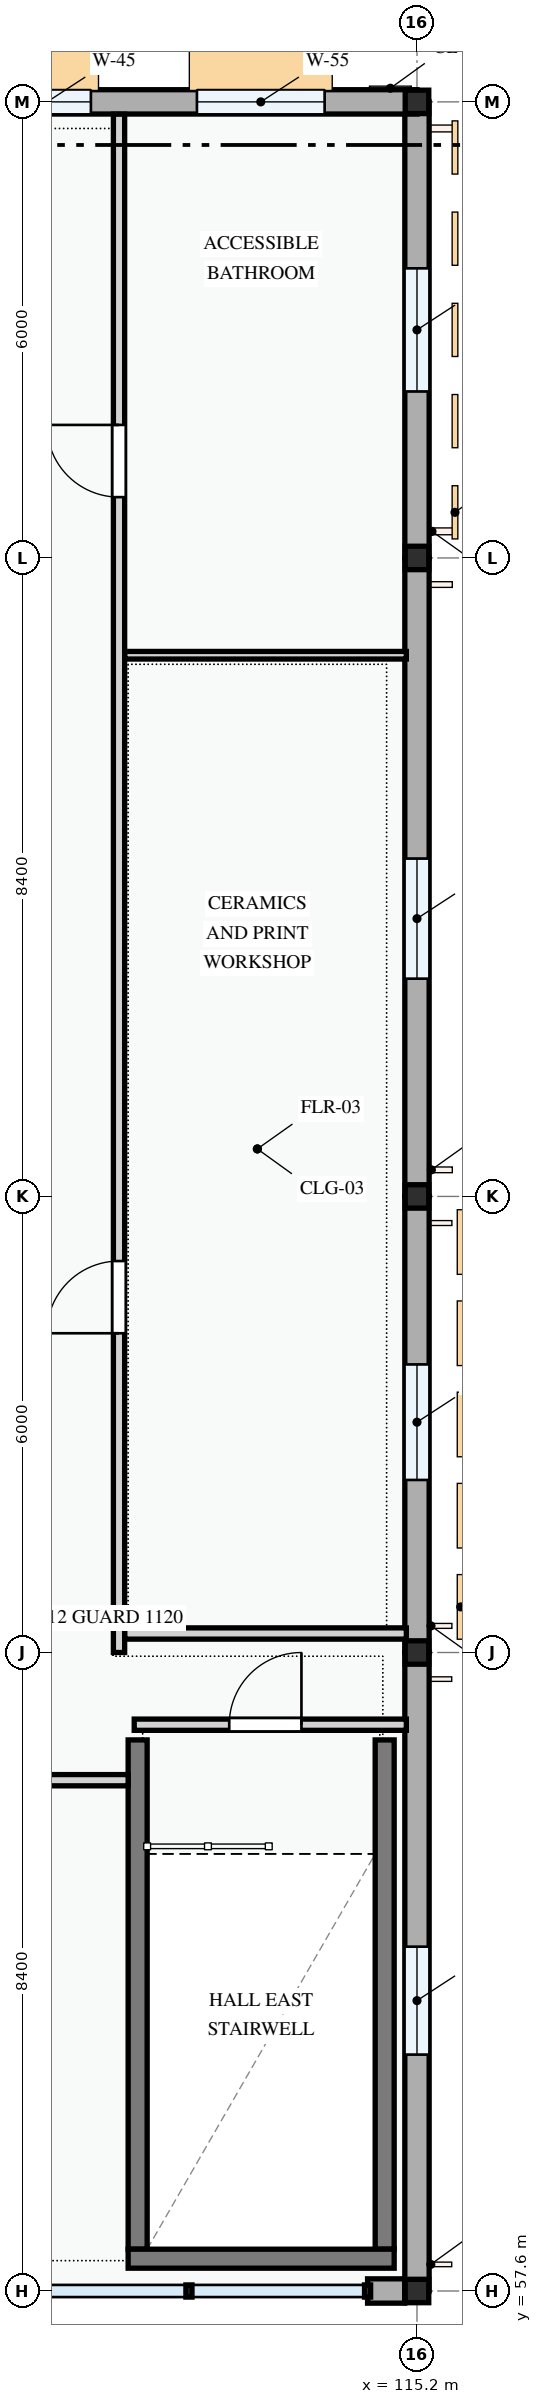
"""IFC4 building model, lengths in metres.
Left out: names, types, materials, properties, quantities, classifications, styles, units other than length and angle.
Written with IfcOpenShell. Run it as: python <this file> out.ifc"""

import sys

from ifc_helpers import new_model, si_unit, direction, frame, frame_2d, origin, origin_2d, place, context, subcontext, project, spatial, rectangle, i_section, extrude, element, fill, save


model = new_model("IFC4")
c1 = context("Model", 3, precision=1e-05, world=origin(), true_north=direction((0.0, 1.0)))
c2 = subcontext(c1, "Body", "Model", "MODEL_VIEW")
j1 = project(units=[si_unit("LENGTHUNIT", "METRE"), si_unit("PLANEANGLEUNIT", "RADIAN")], contexts=[c1])
p1 = place(None, origin())
s1 = spatial("IfcSite", under=j1, at=p1, CompositionType="ELEMENT")
p2 = place(p1, origin())
s2 = spatial("IfcBuilding", under=s1, at=p2, CompositionType="ELEMENT")
p3 = place(p2, frame((0.0, 0.0, 4.5)))
s3 = spatial("IfcBuildingStorey", under=s2, at=p3, CompositionType="ELEMENT", Elevation=4.5)
for number, where, z_axis, x_axis in (
    (1, (115.2, 57.6, 0.0), (0.0, 0.0, 1.0), (1.0, 0.0, 0.0)),
    (2, (115.2, 66.0, 0.0), (0.0, 0.0, 1.0), (1.0, 0.0, 0.0)),
    (3, (115.2, 72.0, 0.0), (0.0, 0.0, 1.0), (1.0, 0.0, 0.0)),
    (4, (115.2, 80.4, 0.0), (0.0, 0.0, 1.0), (1.0, 0.0, 0.0)),
    (5, (115.2, 86.4, 0.0), (0.0, 0.0, 1.0), (1.0, 0.0, 0.0)),
):
    element("IfcColumn", number, at=place(p3, frame(where, z_axis=z_axis, x_axis=x_axis)), inside=s3, PredefinedType="COLUMN", context=c2, shape_type="SweptSolid", body=[
        extrude(i_section(OverallWidth=0.31, OverallDepth=0.308, WebThickness=0.015, FlangeThickness=0.015, FilletRadius=0.012, at=origin_2d()), origin(), (0.0, 0.0, 1.0), 3.6),
    ])
p4 = place(p3, frame((114.55, 57.6, 0.0), z_axis=(0.0, 0.0, 1.0), x_axis=(1.0, 0.0, 0.0)))
e6 = element("IfcWall", 6, at=p4, inside=s3, PredefinedType="STANDARD", context=c2, shape_type="SweptSolid", body=[
    extrude(rectangle(XDim=0.488, YDim=0.32, at=frame_2d((0.244, 0.0))), origin(), (0.0, 0.0, 1.0), 2.862),
])
p5 = place(p3, frame((115.2, 57.6, 0.0), z_axis=(0.0, 0.0, 1.0), x_axis=(0.0, 1.0, 0.0)))
e7 = element("IfcWall", 7, at=p5, inside=s3, PredefinedType="STANDARD", context=c2, shape_type="SweptSolid", body=[
    extrude(rectangle(XDim=8.4, YDim=0.32, at=frame_2d((4.2, 0.0))), origin(), (0.0, 0.0, 1.0), 2.79),
])
p6 = place(p5, frame((3.11, 0.0, 0.85)))
e8 = element("IfcOpeningElement", 8, at=p6, cuts=e7, PredefinedType="OPENING", context=c2, shape_type="SweptSolid", body=[
    extrude(rectangle(XDim=1.42, YDim=1.38, at=frame_2d((0.71, 0.69))), frame((0.0, 0.17, 0.0), z_axis=(0.0, -1.0, 0.0), x_axis=(1.0, 0.0, 0.0)), (0.0, 0.0, 1.0), 0.34),
])
p7 = place(p3, frame((115.2, 66.0, 0.0), z_axis=(0.0, 0.0, 1.0), x_axis=(0.0, 1.0, 0.0)))
e9 = element("IfcWall", 9, at=p7, inside=s3, PredefinedType="STANDARD", context=c2, shape_type="SweptSolid", body=[
    extrude(rectangle(XDim=6.0, YDim=0.32, at=frame_2d((3.0, 0.0))), origin(), (0.0, 0.0, 1.0), 2.912),
])
p8 = place(p7, frame((2.27, 0.0, 0.85)))
e10 = element("IfcOpeningElement", 10, at=p8, cuts=e9, PredefinedType="OPENING", context=c2, shape_type="SweptSolid", body=[
    extrude(rectangle(XDim=1.52, YDim=1.42, at=frame_2d((0.76, 0.71))), frame((0.0, 0.17, 0.0), z_axis=(0.0, -1.0, 0.0), x_axis=(1.0, 0.0, 0.0)), (0.0, 0.0, 1.0), 0.34),
])
p9 = place(p3, frame((115.2, 72.0, 0.0), z_axis=(0.0, 0.0, 1.0), x_axis=(0.0, 1.0, 0.0)))
e11 = element("IfcWall", 11, at=p9, inside=s3, PredefinedType="STANDARD", context=c2, shape_type="SweptSolid", body=[
    extrude(rectangle(XDim=8.4, YDim=0.32, at=frame_2d((4.2, 0.0))), origin(), (0.0, 0.0, 1.0), 2.79),
])
p10 = place(p9, frame((2.865, 0.0, 0.85)))
e12 = element("IfcOpeningElement", 12, at=p10, cuts=e11, PredefinedType="OPENING", context=c2, shape_type="SweptSolid", body=[
    extrude(rectangle(XDim=1.58, YDim=1.48, at=frame_2d((0.79, 0.74))), frame((0.0, 0.17, 0.0), z_axis=(0.0, -1.0, 0.0), x_axis=(1.0, 0.0, 0.0)), (0.0, 0.0, 1.0), 0.34),
])
p11 = place(p3, frame((115.2, 80.4, 0.0), z_axis=(0.0, 0.0, 1.0), x_axis=(0.0, 1.0, 0.0)))
e13 = element("IfcWall", 13, at=p11, inside=s3, PredefinedType="STANDARD", context=c2, shape_type="SweptSolid", body=[
    extrude(rectangle(XDim=6.0, YDim=0.32, at=frame_2d((3.0, 0.0))), origin(), (0.0, 0.0, 1.0), 2.912),
])
p12 = place(p11, frame((2.19, 0.0, 0.85)))
e14 = element("IfcOpeningElement", 14, at=p12, cuts=e13, PredefinedType="OPENING", context=c2, shape_type="SweptSolid", body=[
    extrude(rectangle(XDim=1.62, YDim=1.38, at=frame_2d((0.81, 0.69))), frame((0.0, 0.17, 0.0), z_axis=(0.0, -1.0, 0.0), x_axis=(1.0, 0.0, 0.0)), (0.0, 0.0, 1.0), 0.34),
])
p13 = place(p3, frame((115.2, 86.4, 0.0), z_axis=(0.0, 0.0, 1.0), x_axis=(-1.0, 0.0, 0.0)))
e15 = element("IfcWall", 15, at=p13, inside=s3, PredefinedType="STANDARD", context=c2, shape_type="SweptSolid", body=[
    extrude(rectangle(XDim=6.0, YDim=0.32, at=frame_2d((3.0, 0.0))), origin(), (0.0, 0.0, 1.0), 2.862),
])
p14 = place(p13, frame((1.215, 0.0, 0.85)))
e16 = element("IfcOpeningElement", 16, at=p14, cuts=e15, PredefinedType="OPENING", context=c2, shape_type="SweptSolid", body=[
    extrude(rectangle(XDim=1.68, YDim=1.46, at=frame_2d((0.84, 0.73))), frame((0.0, 0.17, 0.0), z_axis=(0.0, -1.0, 0.0), x_axis=(1.0, 0.0, 0.0)), (0.0, 0.0, 1.0), 0.34),
])
p15 = place(p13, frame((4.29, 0.0, 0.85)))
e17 = element("IfcOpeningElement", 17, at=p15, cuts=e15, PredefinedType="OPENING", context=c2, shape_type="SweptSolid", body=[
    extrude(rectangle(XDim=1.15, YDim=1.25, at=frame_2d((0.575, 0.625))), frame((0.0, 0.17, 0.0), z_axis=(0.0, -1.0, 0.0), x_axis=(1.0, 0.0, 0.0)), (0.0, 0.0, 1.0), 0.34),
])
for number, where, z_axis, x_axis in (
    (18, (111.525, 64.85, 0.0), (0.0, 0.0, 1.0), (0.0, -1.0, 0.0)),
    (19, (114.775, 64.85, 0.0), (0.0, 0.0, 1.0), (0.0, -1.0, 0.0)),
):
    element("IfcWall", number, at=place(p3, frame(where, z_axis=z_axis, x_axis=x_axis)), inside=s3, PredefinedType="SHEAR", context=c2, shape_type="SweptSolid", body=[
        extrude(rectangle(XDim=6.7, YDim=0.25, at=frame_2d((3.35, 0.0))), origin(), (0.0, 0.0, 1.0), 3.3),
    ])
p16 = place(p3, frame((111.4, 58.025, 0.0), z_axis=(0.0, 0.0, 1.0), x_axis=(1.0, 0.0, 0.0)))
e20 = element("IfcWall", 20, at=p16, inside=s3, PredefinedType="SHEAR", context=c2, shape_type="SweptSolid", body=[
    extrude(rectangle(XDim=3.5, YDim=0.25, at=frame_2d((1.75, 0.0))), origin(), (0.0, 0.0, 1.0), 3.3),
])
p17 = place(p3, frame((94.72, 64.32, 0.0), z_axis=(0.0, 0.0, 1.0), x_axis=(1.0, 0.0, 0.0)))
e21 = element("IfcWall", 21, at=p17, inside=s3, PredefinedType="PARTITIONING", context=c2, shape_type="SweptSolid", body=[
    extrude(rectangle(XDim=16.68, YDim=0.148, at=frame_2d((8.34, 0.0))), origin(), (0.0, 0.0, 1.0), 3.3),
])
p18 = place(p17, frame((7.078, 0.0, 0.0)))
e22 = element("IfcOpeningElement", 22, at=p18, cuts=e21, PredefinedType="OPENING", context=c2, shape_type="SweptSolid", body=[
    extrude(rectangle(XDim=1.0, YDim=2.15, at=frame_2d((0.5, 1.075))), frame((0.0, 0.084, 0.0), z_axis=(0.0, -1.0, 0.0), x_axis=(1.0, 0.0, 0.0)), (0.0, 0.0, 1.0), 0.168),
])
p19 = place(p3, frame((111.28, 66.0, 0.0), z_axis=(0.0, 0.0, 1.0), x_axis=(0.0, 1.0, 0.0)))
e23 = element("IfcWall", 23, at=p19, inside=s3, PredefinedType="PARTITIONING", context=c2, shape_type="SweptSolid", body=[
    extrude(rectangle(XDim=20.238, YDim=0.148, at=frame_2d((10.119, 0.0))), origin(), (0.0, 0.0, 1.0), 3.3),
])
p20 = place(p19, frame((4.2, 0.0, 0.0)))
e24 = element("IfcOpeningElement", 24, at=p20, cuts=e23, PredefinedType="OPENING", context=c2, shape_type="SweptSolid", body=[
    extrude(rectangle(XDim=0.95, YDim=2.1, at=frame_2d((0.475, 1.05))), frame((0.0, 0.084, 0.0), z_axis=(0.0, -1.0, 0.0), x_axis=(1.0, 0.0, 0.0)), (0.0, 0.0, 1.0), 0.168),
])
p21 = place(p19, frame((15.2, 0.0, 0.0)))
e25 = element("IfcOpeningElement", 25, at=p21, cuts=e23, PredefinedType="OPENING", context=c2, shape_type="SweptSolid", body=[
    extrude(rectangle(XDim=0.95, YDim=2.1, at=frame_2d((0.475, 1.05))), frame((0.0, 0.084, 0.0), z_axis=(0.0, -1.0, 0.0), x_axis=(1.0, 0.0, 0.0)), (0.0, 0.0, 1.0), 0.168),
])
p22 = place(p3, frame((111.356, 79.12, 0.0), z_axis=(0.0, 0.0, 1.0), x_axis=(1.0, 0.0, 0.0)))
e26 = element("IfcWall", 26, at=p22, inside=s3, PredefinedType="PARTITIONING", context=c2, shape_type="SweptSolid", body=[
    extrude(rectangle(XDim=3.704, YDim=0.1, at=frame_2d((1.852, 0.0))), origin(), (0.0, 0.0, 1.0), 3.3),
])
p23 = place(p3, frame((111.356, 66.25, 0.0), z_axis=(0.0, 0.0, 1.0), x_axis=(1.0, 0.0, 0.0)))
e27 = element("IfcWall", 27, at=p23, inside=s3, PredefinedType="PARTITIONING", context=c2, shape_type="SweptSolid", body=[
    extrude(rectangle(XDim=3.704, YDim=0.148, at=frame_2d((1.852, 0.0))), origin(), (0.0, 0.0, 1.0), 2.862),
])
p24 = place(p3, frame((111.48, 65.05, 0.0), z_axis=(0.0, 0.0, 1.0), x_axis=(1.0, 0.0, 0.0)))
e28 = element("IfcWall", 28, at=p24, inside=s3, PredefinedType="PARTITIONING", context=c2, shape_type="SweptSolid", body=[
    extrude(rectangle(XDim=3.58, YDim=0.148, at=frame_2d((1.79, 0.0))), origin(), (0.0, 0.0, 1.0), 3.3),
])
p25 = place(p24, frame((1.25, 0.0, 0.0)))
e29 = element("IfcOpeningElement", 29, at=p25, cuts=e28, PredefinedType="OPENING", context=c2, shape_type="SweptSolid", body=[
    extrude(rectangle(XDim=0.95, YDim=2.1, at=frame_2d((0.475, 1.05))), frame((0.0, 0.084, 0.0), z_axis=(0.0, -1.0, 0.0), x_axis=(1.0, 0.0, 0.0)), (0.0, 0.0, 1.0), 0.168),
])
p26 = place(p6, origin())
e30 = element("IfcWindow", 30, at=p26, inside=s3, PartitioningType="SINGLE_PANEL", PredefinedType="WINDOW", context=c2, shape_type="SweptSolid", body=[
    extrude(rectangle(XDim=1.42, YDim=1.38, at=frame_2d((0.71, 0.69))), frame((0.0, 0.03, 0.0), z_axis=(0.0, -1.0, 0.0), x_axis=(1.0, 0.0, 0.0)), (0.0, 0.0, 1.0), 0.06),
])
fill(e8, e30)
p27 = place(p8, origin())
e31 = element("IfcWindow", 31, at=p27, inside=s3, PartitioningType="SINGLE_PANEL", PredefinedType="WINDOW", context=c2, shape_type="SweptSolid", body=[
    extrude(rectangle(XDim=1.52, YDim=1.42, at=frame_2d((0.76, 0.71))), frame((0.0, 0.03, 0.0), z_axis=(0.0, -1.0, 0.0), x_axis=(1.0, 0.0, 0.0)), (0.0, 0.0, 1.0), 0.06),
])
fill(e10, e31)
p28 = place(p10, origin())
e32 = element("IfcWindow", 32, at=p28, inside=s3, PartitioningType="SINGLE_PANEL", PredefinedType="WINDOW", context=c2, shape_type="SweptSolid", body=[
    extrude(rectangle(XDim=1.58, YDim=1.48, at=frame_2d((0.79, 0.74))), frame((0.0, 0.03, 0.0), z_axis=(0.0, -1.0, 0.0), x_axis=(1.0, 0.0, 0.0)), (0.0, 0.0, 1.0), 0.06),
])
fill(e12, e32)
p29 = place(p12, origin())
e33 = element("IfcWindow", 33, at=p29, inside=s3, PartitioningType="DOUBLE_PANEL_VERTICAL", PredefinedType="WINDOW", context=c2, shape_type="SweptSolid", body=[
    extrude(rectangle(XDim=1.62, YDim=1.38, at=frame_2d((0.81, 0.69))), frame((0.0, 0.03, 0.0), z_axis=(0.0, -1.0, 0.0), x_axis=(1.0, 0.0, 0.0)), (0.0, 0.0, 1.0), 0.06),
])
fill(e14, e33)
p30 = place(p14, origin())
e34 = element("IfcWindow", 34, at=p30, inside=s3, PartitioningType="DOUBLE_PANEL_VERTICAL", PredefinedType="WINDOW", context=c2, shape_type="SweptSolid", body=[
    extrude(rectangle(XDim=1.68, YDim=1.46, at=frame_2d((0.84, 0.73))), frame((0.0, 0.03, 0.0), z_axis=(0.0, -1.0, 0.0), x_axis=(1.0, 0.0, 0.0)), (0.0, 0.0, 1.0), 0.06),
])
fill(e16, e34)
p31 = place(p15, origin())
e35 = element("IfcWindow", 35, at=p31, inside=s3, PartitioningType="SINGLE_PANEL", PredefinedType="WINDOW", context=c2, shape_type="SweptSolid", body=[
    extrude(rectangle(XDim=1.15, YDim=1.25, at=frame_2d((0.575, 0.625))), frame((0.0, 0.03, 0.0), z_axis=(0.0, -1.0, 0.0), x_axis=(1.0, 0.0, 0.0)), (0.0, 0.0, 1.0), 0.06),
])
fill(e17, e35)
p32 = place(p20, origin())
e36 = element("IfcDoor", 36, at=p32, inside=s3, OperationType="SINGLE_SWING_LEFT", PredefinedType="DOOR", context=c2, shape_type="SweptSolid", body=[
    extrude(rectangle(XDim=0.95, YDim=2.1, at=frame_2d((0.475, 1.05))), frame((0.0, 0.025, 0.0), z_axis=(0.0, -1.0, 0.0), x_axis=(1.0, 0.0, 0.0)), (0.0, 0.0, 1.0), 0.05),
])
fill(e24, e36)
p33 = place(p21, origin())
e37 = element("IfcDoor", 37, at=p33, inside=s3, OperationType="SINGLE_SWING_RIGHT", PredefinedType="DOOR", context=c2, shape_type="SweptSolid", body=[
    extrude(rectangle(XDim=0.95, YDim=2.1, at=frame_2d((0.475, 1.05))), frame((0.0, 0.025, 0.0), z_axis=(0.0, -1.0, 0.0), x_axis=(1.0, 0.0, 0.0)), (0.0, 0.0, 1.0), 0.05),
])
fill(e25, e37)
p34 = place(p25, origin())
e38 = element("IfcDoor", 38, at=p34, inside=s3, OperationType="SINGLE_SWING_RIGHT", PredefinedType="DOOR", context=c2, shape_type="SweptSolid", body=[
    extrude(rectangle(XDim=0.95, YDim=2.1, at=frame_2d((0.475, 1.05))), frame((0.0, 0.025, 0.0), z_axis=(0.0, -1.0, 0.0), x_axis=(1.0, 0.0, 0.0)), (0.0, 0.0, 1.0), 0.05),
])
fill(e29, e38)
save(model, sys.argv[1])
